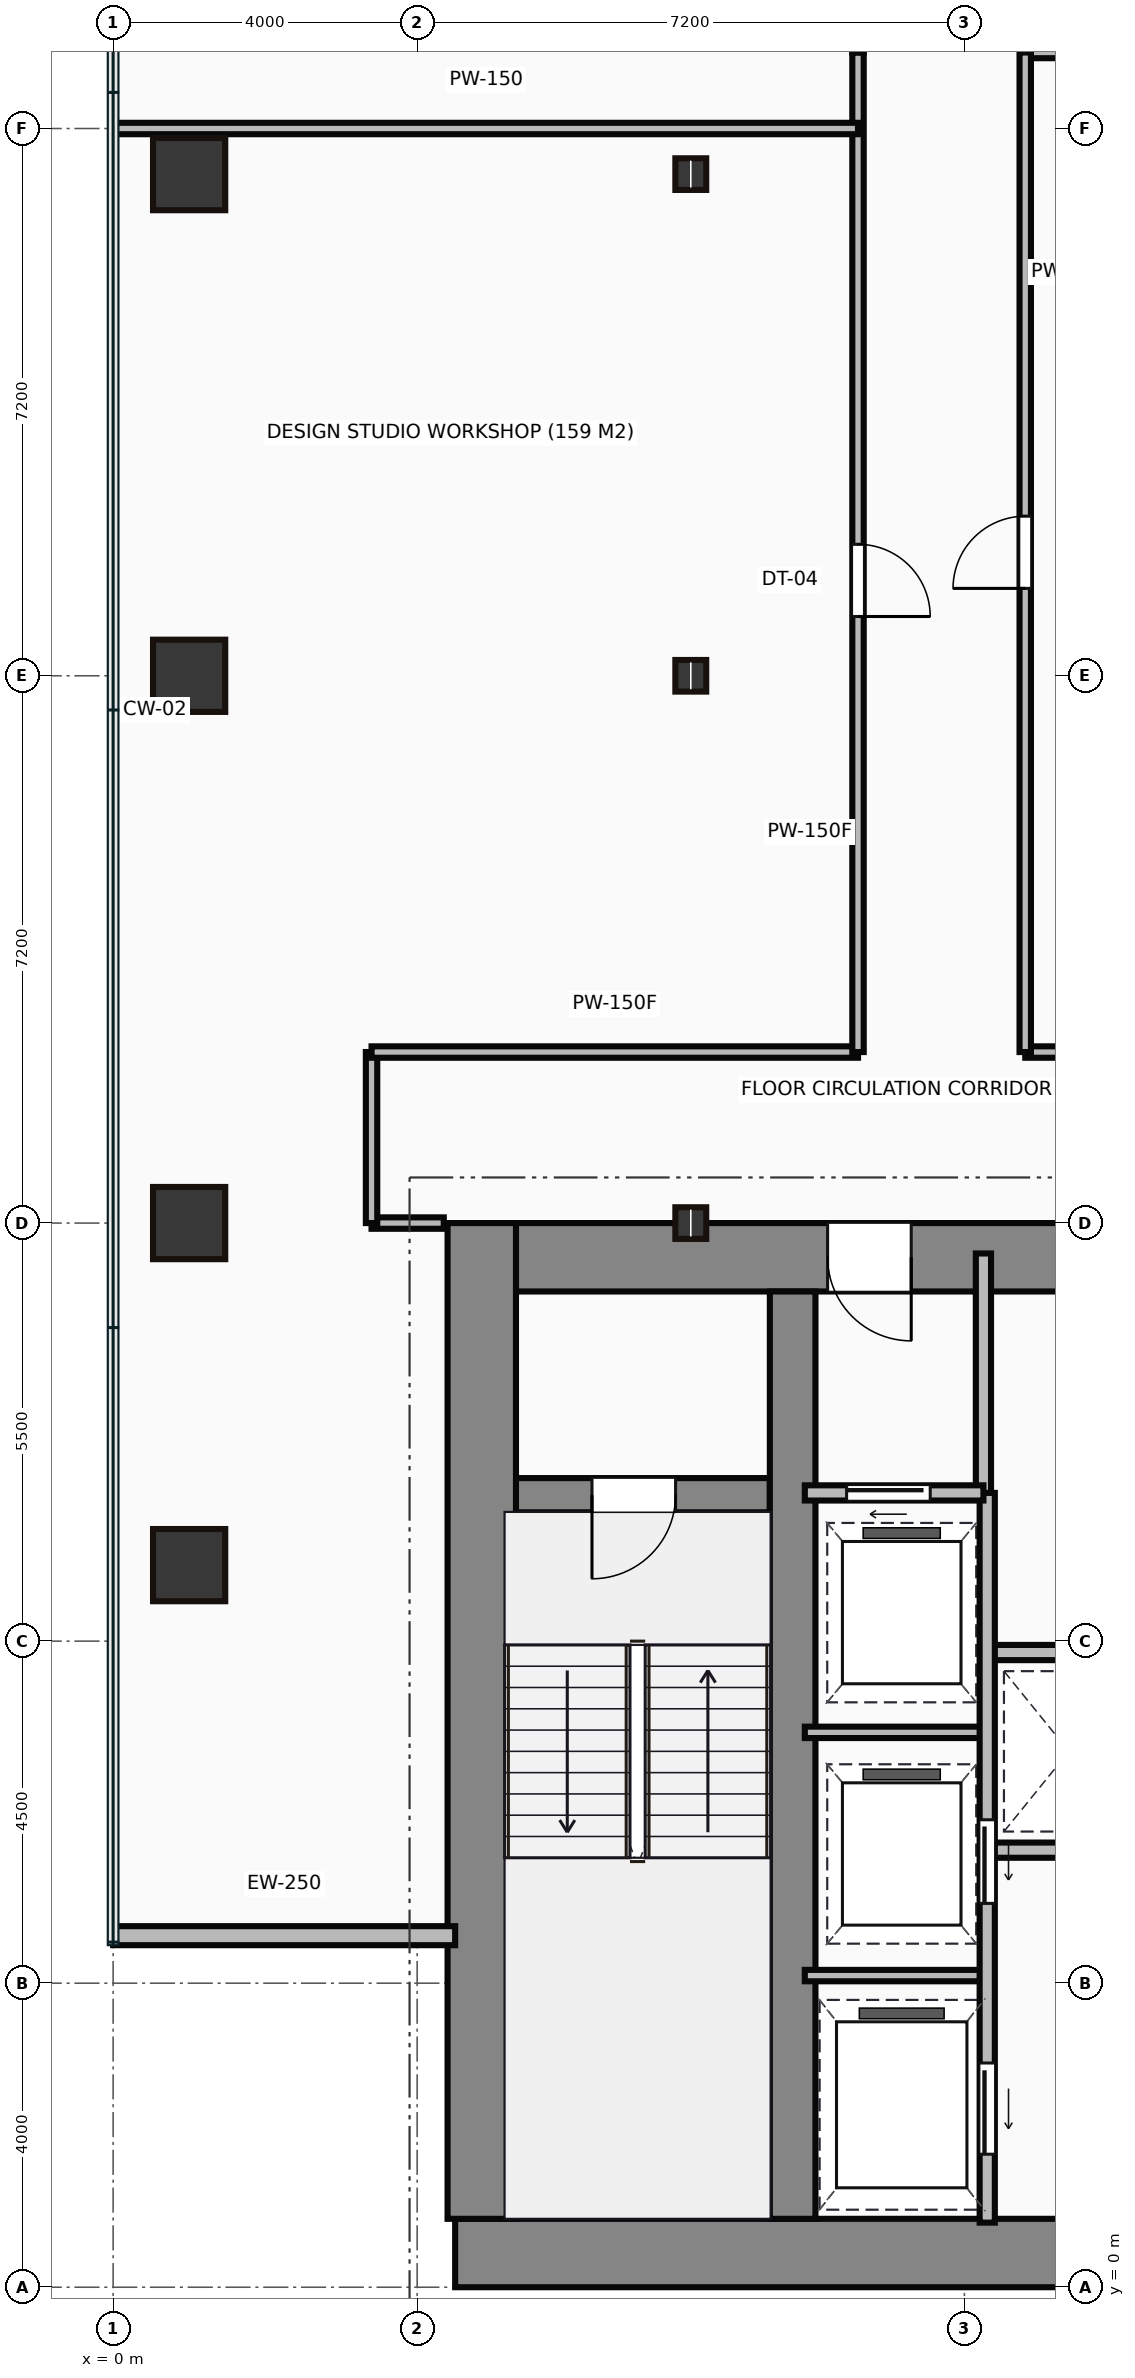
"""IFC4 building model, lengths in metres.
Left out: names, types, materials, properties, quantities, classifications, styles, units other than length and angle.
Written with IfcOpenShell. Run it as: python <this file> out.ifc"""

import sys

from ifc_helpers import new_model, si_unit, direction, frame, frame_2d, origin, origin_2d, place, context, subcontext, project, spatial, rectangle, hollow_rectangle, i_section, extrude, source, transform, mapped, element, fill, save


model = new_model("IFC4")
c1 = context("Model", 3, precision=1e-05, world=origin(), true_north=direction((0.0, 1.0)))
c2 = subcontext(c1, "Body", "Model", "MODEL_VIEW")
j1 = project(units=[si_unit("LENGTHUNIT", "METRE"), si_unit("PLANEANGLEUNIT", "RADIAN")], contexts=[c1])
p1 = place(None, origin())
s1 = spatial("IfcSite", under=j1, at=p1, CompositionType="ELEMENT")
p2 = place(p1, origin())
s2 = spatial("IfcBuilding", under=s1, at=p2, CompositionType="ELEMENT")
p3 = place(p2, frame((0.0, 0.0, 54.4)))
s3 = spatial("IfcBuildingStorey", under=s2, at=p3, CompositionType="ELEMENT", Elevation=54.4)
m1 = source(origin(), c2, "Body", "SweptSolid", [
    extrude(rectangle(XDim=29.5, YDim=0.9, at=frame_2d((14.75, 0.0))), origin(), (0.0, 0.0, 1.0), 3.65),
])
p4 = place(p3, frame((4.5, 0.45, 0.0), z_axis=(0.0, 0.0, 1.0), x_axis=(1.0, 0.0, 0.0)))
e1 = element("IfcWall", 1, at=p4, inside=s3, PredefinedType="SHEAR", context=c2, shape_type="MappedRepresentation", body=[
    mapped(m1, transform((0.0, 0.0, 0.0))),
])
m2 = source(origin(), c2, "Body", "SweptSolid", [
    extrude(rectangle(XDim=13.1, YDim=0.9, at=frame_2d((6.55, 0.0))), origin(), (0.0, 0.0, 1.0), 3.65),
])
p5 = place(p3, frame((4.85, 0.9, 0.0), z_axis=(0.0, 0.0, 1.0), x_axis=(0.0, 1.0, 0.0)))
e2 = element("IfcWall", 2, at=p5, inside=s3, PredefinedType="SHEAR", context=c2, shape_type="MappedRepresentation", body=[
    mapped(m2, transform((0.0, 0.0, 0.0))),
])
m3 = source(origin(), c2, "Body", "SweptSolid", [
    extrude(rectangle(XDim=9.1, YDim=0.9, at=frame_2d((4.55, 0.0))), origin(), (0.0, 0.0, 1.0), 3.65),
])
p6 = place(p3, frame((5.3, 13.55, 0.0), z_axis=(0.0, 0.0, 1.0), x_axis=(1.0, 0.0, 0.0)))
e3 = element("IfcWall", 3, at=p6, inside=s3, PredefinedType="SHEAR", context=c2, shape_type="MappedRepresentation", body=[
    mapped(m3, transform((0.0, 0.0, 0.0))),
])
p7 = place(p6, frame((4.1, 0.0, 0.0)))
e4 = element("IfcOpeningElement", 4, at=p7, cuts=e3, PredefinedType="OPENING", context=c2, shape_type="SweptSolid", body=[
    extrude(rectangle(XDim=1.1, YDim=2.15, at=frame_2d((0.55, 1.075))), frame((0.0, 0.46, 0.0), z_axis=(0.0, -1.0, 0.0), x_axis=(1.0, 0.0, 0.0)), (0.0, 0.0, 1.0), 0.92),
])
m4 = source(origin(), c2, "Body", "SweptSolid", [
    extrude(rectangle(XDim=12.2, YDim=0.6, at=frame_2d((6.1, 0.0))), origin(), (0.0, 0.0, 1.0), 3.65),
])
p8 = place(p3, frame((8.94, 0.9, 0.0), z_axis=(0.0, 0.0, 1.0), x_axis=(0.0, 1.0, 0.0)))
e5 = element("IfcWall", 5, at=p8, inside=s3, PredefinedType="SHEAR", context=c2, shape_type="MappedRepresentation", body=[
    mapped(m4, transform((0.0, 0.0, 0.0))),
])
m5 = source(origin(), c2, "Body", "SweptSolid", [
    extrude(rectangle(XDim=3.39, YDim=0.45, at=frame_2d((1.695, 0.0))), origin(), (0.0, 0.0, 1.0), 3.65),
])
p9 = place(p3, frame((5.25, 10.42, 0.0), z_axis=(0.0, 0.0, 1.0), x_axis=(1.0, 0.0, 0.0)))
e6 = element("IfcWall", 6, at=p9, inside=s3, PredefinedType="SHEAR", context=c2, shape_type="MappedRepresentation", body=[
    mapped(m5, transform((0.0, 0.0, 0.0))),
])
p10 = place(p9, frame((1.05, 0.0, 0.0)))
e7 = element("IfcOpeningElement", 7, at=p10, cuts=e6, PredefinedType="OPENING", context=c2, shape_type="SweptSolid", body=[
    extrude(rectangle(XDim=1.1, YDim=2.15, at=frame_2d((0.55, 1.075))), frame((0.0, 0.235, 0.0), z_axis=(0.0, -1.0, 0.0), x_axis=(1.0, 0.0, 0.0)), (0.0, 0.0, 1.0), 0.47),
])
m6 = source(origin(), c2, "Body", "SweptSolid", [
    extrude(hollow_rectangle(XDim=0.95, YDim=0.95, WallThickness=0.045, at=origin_2d()), origin(), (0.0, 0.0, 1.0), 3.65),
])
for number, where, z_axis, x_axis in (
    (8, (1.0, 9.5, 0.0), (0.0, 0.0, 1.0), (1.0, 0.0, 0.0)),
    (9, (1.0, 14.0, 0.0), (0.0, 0.0, 1.0), (1.0, 0.0, 0.0)),
    (10, (1.0, 21.2, 0.0), (0.0, 0.0, 1.0), (1.0, 0.0, 0.0)),
    (11, (1.0, 27.8, 0.0), (0.0, 0.0, 1.0), (1.0, 0.0, 0.0)),
):
    element("IfcColumn", number, at=place(p3, frame(where, z_axis=z_axis, x_axis=x_axis)), inside=s3, PredefinedType="COLUMN", context=c2, shape_type="MappedRepresentation", body=[
        mapped(m6, transform((0.0, 0.0, 0.0))),
    ])
m7 = source(origin(), c2, "Body", "SweptSolid", [
    extrude(i_section(OverallWidth=0.406, OverallDepth=0.416, WebThickness=0.03, FlangeThickness=0.048, at=origin_2d()), origin(), (0.0, 0.0, 1.0), 3.65),
])
for number, where, z_axis, x_axis in (
    (12, (7.6, 14.0, 0.0), (0.0, 0.0, 1.0), (1.0, 0.0, 0.0)),
    (13, (7.6, 21.2, 0.0), (0.0, 0.0, 1.0), (1.0, 0.0, 0.0)),
    (14, (7.6, 27.8, 0.0), (0.0, 0.0, 1.0), (1.0, 0.0, 0.0)),
):
    element("IfcColumn", number, at=place(p3, frame(where, z_axis=z_axis, x_axis=x_axis)), inside=s3, PredefinedType="COLUMN", context=c2, shape_type="MappedRepresentation", body=[
        mapped(m7, transform((0.0, 0.0, 0.0))),
    ])
m8 = source(origin(), c2, "Body", "SweptSolid", [
    extrude(rectangle(XDim=4.5, YDim=0.25, at=frame_2d((2.25, 0.0))), origin(), (0.0, 0.0, 1.0), 3.4),
])
p11 = place(p3, frame((0.0, 4.625, 0.0), z_axis=(0.0, 0.0, 1.0), x_axis=(1.0, 0.0, 0.0)))
e15 = element("IfcWall", 15, at=p11, inside=s3, PredefinedType="STANDARD", context=c2, shape_type="MappedRepresentation", body=[
    mapped(m8, transform((0.0, 0.0, 0.0))),
])
m9 = source(origin(), c2, "Body", "SweptSolid", [
    extrude(rectangle(XDim=3.18, YDim=0.2, at=frame_2d((1.59, 0.0))), origin(), (0.0, 0.0, 1.0), 3.4),
])
p12 = place(p3, frame((11.45, 10.42, 0.0), z_axis=(0.0, 0.0, 1.0), x_axis=(0.0, 1.0, 0.0)))
e16 = element("IfcWall", 16, at=p12, inside=s3, PredefinedType="PARTITIONING", context=c2, shape_type="MappedRepresentation", body=[
    mapped(m9, transform((0.0, 0.0, 0.0))),
])
m10 = source(origin(), c2, "Body", "SweptSolid", [
    extrude(rectangle(XDim=2.35, YDim=0.2, at=frame_2d((1.175, 0.0))), origin(), (0.0, 0.0, 1.0), 3.4),
])
p13 = place(p3, frame((9.1, 10.45, 0.0), z_axis=(0.0, 0.0, 1.0), x_axis=(1.0, 0.0, 0.0)))
e17 = element("IfcWall", 17, at=p13, inside=s3, PredefinedType="PARTITIONING", context=c2, shape_type="MappedRepresentation", body=[
    mapped(m10, transform((0.0, 0.0, 0.0))),
])
p14 = place(p13, frame((0.55, 0.0, 0.0)))
e18 = element("IfcOpeningElement", 18, at=p14, cuts=e17, PredefinedType="OPENING", context=c2, shape_type="SweptSolid", body=[
    extrude(rectangle(XDim=1.1, YDim=2.15, at=frame_2d((0.55, 1.075))), frame((0.0, 0.11, 0.0), z_axis=(0.0, -1.0, 0.0), x_axis=(1.0, 0.0, 0.0)), (0.0, 0.0, 1.0), 0.22),
])
m11 = source(origin(), c2, "Body", "SweptSolid", [
    extrude(rectangle(XDim=9.6, YDim=0.2, at=frame_2d((4.8, 0.0))), origin(), (0.0, 0.0, 1.0), 3.4),
])
p15 = place(p3, frame((11.5, 0.85, 0.0), z_axis=(0.0, 0.0, 1.0), x_axis=(0.0, 1.0, 0.0)))
e19 = element("IfcWall", 19, at=p15, inside=s3, PredefinedType="PARTITIONING", context=c2, shape_type="MappedRepresentation", body=[
    mapped(m11, transform((0.0, 0.0, 0.0))),
])
p16 = place(p15, frame((4.2, 0.0, 0.0)))
e20 = element("IfcOpeningElement", 20, at=p16, cuts=e19, PredefinedType="OPENING", context=c2, shape_type="SweptSolid", body=[
    extrude(rectangle(XDim=1.1, YDim=2.15, at=frame_2d((0.55, 1.075))), frame((0.0, 0.11, 0.0), z_axis=(0.0, -1.0, 0.0), x_axis=(1.0, 0.0, 0.0)), (0.0, 0.0, 1.0), 0.22),
])
p17 = place(p15, frame((0.9, 0.0, 0.0)))
e21 = element("IfcOpeningElement", 21, at=p17, cuts=e19, PredefinedType="OPENING", context=c2, shape_type="SweptSolid", body=[
    extrude(rectangle(XDim=1.2, YDim=2.15, at=frame_2d((0.6, 1.075))), frame((0.0, 0.11, 0.0), z_axis=(0.0, -1.0, 0.0), x_axis=(1.0, 0.0, 0.0)), (0.0, 0.0, 1.0), 0.22),
])
m12 = source(origin(), c2, "Body", "SweptSolid", [
    extrude(rectangle(XDim=2.4, YDim=0.15, at=frame_2d((1.2, 0.0))), origin(), (0.0, 0.0, 1.0), 3.4),
])
for number, where, z_axis, x_axis in (
    (22, (9.1, 4.1, 0.0), (0.0, 0.0, 1.0), (1.0, 0.0, 0.0)),
    (23, (9.1, 7.3, 0.0), (0.0, 0.0, 1.0), (1.0, 0.0, 0.0)),
):
    element("IfcWall", number, at=place(p3, frame(where, z_axis=z_axis, x_axis=x_axis)), inside=s3, PredefinedType="PARTITIONING", context=c2, shape_type="MappedRepresentation", body=[
        mapped(m12, transform((0.0, 0.0, 0.0))),
    ])
m13 = source(origin(), c2, "Body", "SweptSolid", [
    extrude(rectangle(XDim=11.85, YDim=0.2, at=frame_2d((5.925, 0.0))), origin(), (0.0, 0.0, 1.0), 3.4),
])
for number, where, z_axis, x_axis in (
    (24, (11.55, 5.75, 0.0), (0.0, 0.0, 1.0), (1.0, 0.0, 0.0)),
    (25, (11.55, 8.35, 0.0), (0.0, 0.0, 1.0), (1.0, 0.0, 0.0)),
):
    element("IfcWall", number, at=place(p3, frame(where, z_axis=z_axis, x_axis=x_axis)), inside=s3, PredefinedType="PARTITIONING", context=c2, shape_type="MappedRepresentation", body=[
        mapped(m13, transform((0.0, 0.0, 0.0))),
    ])
m14 = source(origin(), c2, "Body", "SweptSolid", [
    extrude(rectangle(XDim=0.95, YDim=0.15, at=frame_2d((0.475, 0.0))), origin(), (0.0, 0.0, 1.0), 2.625),
])
p18 = place(p3, frame((4.35, 14.0, 0.0), z_axis=(0.0, 0.0, 1.0), x_axis=(-1.0, 0.0, 0.0)))
e26 = element("IfcWall", 26, at=p18, inside=s3, PredefinedType="PARTITIONING", context=c2, shape_type="MappedRepresentation", body=[
    mapped(m14, transform((0.0, 0.0, 0.0))),
])
m15 = source(origin(), c2, "Body", "SweptSolid", [
    extrude(rectangle(XDim=2.25, YDim=0.15, at=frame_2d((1.125, 0.0))), origin(), (0.0, 0.0, 1.0), 3.4),
])
p19 = place(p3, frame((3.4, 14.0, 0.0), z_axis=(0.0, 0.0, 1.0), x_axis=(0.0, 1.0, 0.0)))
e27 = element("IfcWall", 27, at=p19, inside=s3, PredefinedType="PARTITIONING", context=c2, shape_type="MappedRepresentation", body=[
    mapped(m15, transform((0.0, 0.0, 0.0))),
])
m16 = source(origin(), c2, "Body", "SweptSolid", [
    extrude(rectangle(XDim=6.4, YDim=0.15, at=frame_2d((3.2, 0.0))), origin(), (0.0, 0.0, 1.0), 3.4),
])
p20 = place(p3, frame((3.4, 16.25, 0.0), z_axis=(0.0, 0.0, 1.0), x_axis=(1.0, 0.0, 0.0)))
e28 = element("IfcWall", 28, at=p20, inside=s3, PredefinedType="PARTITIONING", context=c2, shape_type="MappedRepresentation", body=[
    mapped(m16, transform((0.0, 0.0, 0.0))),
])
m17 = source(origin(), c2, "Body", "SweptSolid", [
    extrude(rectangle(XDim=13.15, YDim=0.15, at=frame_2d((6.575, 0.0))), origin(), (0.0, 0.0, 1.0), 3.4),
])
p21 = place(p3, frame((9.8, 16.25, 0.0), z_axis=(0.0, 0.0, 1.0), x_axis=(0.0, 1.0, 0.0)))
e29 = element("IfcWall", 29, at=p21, inside=s3, PredefinedType="PARTITIONING", context=c2, shape_type="MappedRepresentation", body=[
    mapped(m17, transform((0.0, 0.0, 0.0))),
])
p22 = place(p21, frame((5.73, 0.0, 0.0)))
e30 = element("IfcOpeningElement", 30, at=p22, cuts=e29, PredefinedType="OPENING", context=c2, shape_type="SweptSolid", body=[
    extrude(rectangle(XDim=0.95, YDim=2.15, at=frame_2d((0.475, 1.075))), frame((0.0, 0.085, 0.0), z_axis=(0.0, -1.0, 0.0), x_axis=(1.0, 0.0, 0.0)), (0.0, 0.0, 1.0), 0.17),
])
m18 = source(origin(), c2, "Body", "SweptSolid", [
    extrude(rectangle(XDim=2.05, YDim=0.15, at=frame_2d((1.025, 0.0))), origin(), (0.0, 0.0, 1.0), 3.4),
])
p23 = place(p3, frame((9.8, 29.4, 0.0), z_axis=(0.0, 0.0, 1.0), x_axis=(0.0, 1.0, 0.0)))
e31 = element("IfcWall", 31, at=p23, inside=s3, PredefinedType="PARTITIONING", context=c2, shape_type="MappedRepresentation", body=[
    mapped(m18, transform((0.0, 0.0, 0.0))),
])
p24 = place(p23, frame((0.55, 0.0, 0.0)))
e32 = element("IfcOpeningElement", 32, at=p24, cuts=e31, PredefinedType="OPENING", context=c2, shape_type="SweptSolid", body=[
    extrude(rectangle(XDim=0.95, YDim=2.15, at=frame_2d((0.475, 1.075))), frame((0.0, 0.085, 0.0), z_axis=(0.0, -1.0, 0.0), x_axis=(1.0, 0.0, 0.0)), (0.0, 0.0, 1.0), 0.17),
])
m19 = source(origin(), c2, "Body", "SweptSolid", [
    extrude(rectangle(XDim=25.2, YDim=0.15, at=frame_2d((12.6, 0.0))), origin(), (0.0, 0.0, 1.0), 3.4),
])
p25 = place(p3, frame((12.0, 16.25, 0.0), z_axis=(0.0, 0.0, 1.0), x_axis=(1.0, 0.0, 0.0)))
e33 = element("IfcWall", 33, at=p25, inside=s3, PredefinedType="PARTITIONING", context=c2, shape_type="MappedRepresentation", body=[
    mapped(m19, transform((0.0, 0.0, 0.0))),
])
p26 = place(p25, frame((14.925, 0.0, 0.0)))
e34 = element("IfcOpeningElement", 34, at=p26, cuts=e33, PredefinedType="OPENING", context=c2, shape_type="SweptSolid", body=[
    extrude(rectangle(XDim=0.95, YDim=2.15, at=frame_2d((0.475, 1.075))), frame((0.0, 0.085, 0.0), z_axis=(0.0, -1.0, 0.0), x_axis=(1.0, 0.0, 0.0)), (0.0, 0.0, 1.0), 0.17),
])
p27 = place(p3, frame((37.2, 29.4, 0.0), z_axis=(0.0, 0.0, 1.0), x_axis=(-1.0, 0.0, 0.0)))
e35 = element("IfcWall", 35, at=p27, inside=s3, PredefinedType="PARTITIONING", context=c2, shape_type="MappedRepresentation", body=[
    mapped(m19, transform((0.0, 0.0, 0.0))),
])
p28 = place(p3, frame((12.0, 29.4, 0.0), z_axis=(0.0, 0.0, 1.0), x_axis=(0.0, -1.0, 0.0)))
e36 = element("IfcWall", 36, at=p28, inside=s3, PredefinedType="PARTITIONING", context=c2, shape_type="MappedRepresentation", body=[
    mapped(m17, transform((0.0, 0.0, 0.0))),
])
p29 = place(p28, frame((6.1, 0.0, 0.0)))
e37 = element("IfcOpeningElement", 37, at=p29, cuts=e36, PredefinedType="OPENING", context=c2, shape_type="SweptSolid", body=[
    extrude(rectangle(XDim=0.95, YDim=2.15, at=frame_2d((0.475, 1.075))), frame((0.0, 0.085, 0.0), z_axis=(0.0, -1.0, 0.0), x_axis=(1.0, 0.0, 0.0)), (0.0, 0.0, 1.0), 0.17),
])
m20 = source(origin(), c2, "Body", "SweptSolid", [
    extrude(rectangle(XDim=9.78, YDim=0.15, at=frame_2d((4.89, 0.0))), origin(), (0.0, 0.0, 1.0), 3.4),
])
p30 = place(p3, frame((0.02, 28.4, 0.0), z_axis=(0.0, 0.0, 1.0), x_axis=(1.0, 0.0, 0.0)))
e38 = element("IfcWall", 38, at=p30, inside=s3, PredefinedType="PARTITIONING", context=c2, shape_type="MappedRepresentation", body=[
    mapped(m20, transform((0.0, 0.0, 0.0))),
])
m21 = source(origin(), c2, "Body", "SweptSolid", [
    extrude(rectangle(XDim=1.1, YDim=2.15, at=frame_2d((0.55, 1.075))), frame((0.0, 0.025, 0.0), z_axis=(0.0, -1.0, 0.0), x_axis=(1.0, 0.0, 0.0)), (0.0, 0.0, 1.0), 0.05),
])
p31 = place(p10, frame((1.1, 0.0, 0.0), z_axis=(0.0, 0.0, 1.0), x_axis=(-1.0, 0.0, 0.0)))
e39 = element("IfcDoor", 39, at=p31, inside=s3, OperationType="SINGLE_SWING_LEFT", PredefinedType="DOOR", context=c2, shape_type="MappedRepresentation", body=[
    mapped(m21, transform((0.0, 0.0, 0.0))),
])
fill(e7, e39)
p32 = place(p7, origin())
e40 = element("IfcDoor", 40, at=p32, inside=s3, OperationType="SINGLE_SWING_RIGHT", PredefinedType="DOOR", context=c2, shape_type="MappedRepresentation", body=[
    mapped(m21, transform((0.0, 0.0, 0.0))),
])
fill(e4, e40)
p33 = place(p14, origin())
e41 = element("IfcDoor", 41, at=p33, inside=s3, OperationType="SLIDING_TO_LEFT", PredefinedType="DOOR", context=c2, shape_type="MappedRepresentation", body=[
    mapped(m21, transform((0.0, 0.0, 0.0))),
])
fill(e18, e41)
p34 = place(p16, frame((1.1, 0.0, 0.0), z_axis=(0.0, 0.0, 1.0), x_axis=(-1.0, 0.0, 0.0)))
e42 = element("IfcDoor", 42, at=p34, inside=s3, OperationType="SLIDING_TO_LEFT", PredefinedType="DOOR", context=c2, shape_type="MappedRepresentation", body=[
    mapped(m21, transform((0.0, 0.0, 0.0))),
])
fill(e20, e42)
m22 = source(origin(), c2, "Body", "SweptSolid", [
    extrude(rectangle(XDim=1.2, YDim=2.15, at=frame_2d((0.6, 1.075))), frame((0.0, 0.025, 0.0), z_axis=(0.0, -1.0, 0.0), x_axis=(1.0, 0.0, 0.0)), (0.0, 0.0, 1.0), 0.05),
])
p35 = place(p17, frame((1.2, 0.0, 0.0), z_axis=(0.0, 0.0, 1.0), x_axis=(-1.0, 0.0, 0.0)))
e43 = element("IfcDoor", 43, at=p35, inside=s3, OperationType="SLIDING_TO_LEFT", PredefinedType="DOOR", context=c2, shape_type="MappedRepresentation", body=[
    mapped(m22, transform((0.0, 0.0, 0.0))),
])
fill(e21, e43)
m23 = source(origin(), c2, "Body", "SweptSolid", [
    extrude(rectangle(XDim=0.95, YDim=2.15, at=frame_2d((0.475, 1.075))), frame((0.0, 0.025, 0.0), z_axis=(0.0, -1.0, 0.0), x_axis=(1.0, 0.0, 0.0)), (0.0, 0.0, 1.0), 0.05),
])
p36 = place(p22, origin())
e44 = element("IfcDoor", 44, at=p36, inside=s3, OperationType="SINGLE_SWING_LEFT", PredefinedType="DOOR", context=c2, shape_type="MappedRepresentation", body=[
    mapped(m23, transform((0.0, 0.0, 0.0))),
])
fill(e30, e44)
p37 = place(p29, origin())
e45 = element("IfcDoor", 45, at=p37, inside=s3, OperationType="SINGLE_SWING_RIGHT", PredefinedType="DOOR", context=c2, shape_type="MappedRepresentation", body=[
    mapped(m23, transform((0.0, 0.0, 0.0))),
])
fill(e37, e45)
save(model, sys.argv[1])
